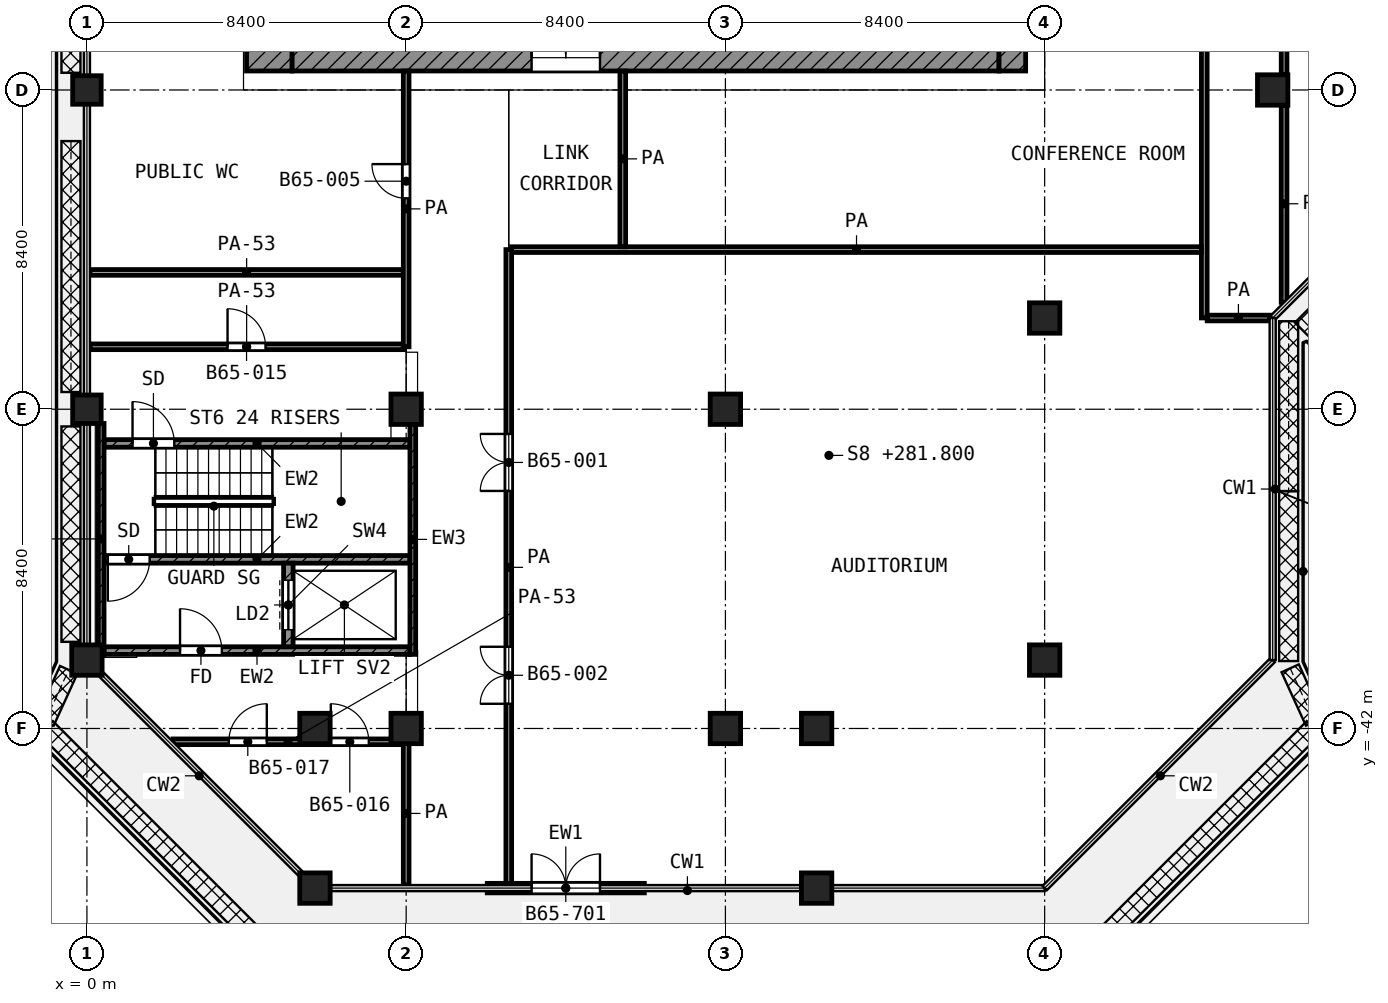
"""IFC4 building model, lengths in metres.
Left out: names, types, materials, properties, quantities, classifications, styles, units other than length and angle.
Written with IfcOpenShell. Run it as: python <this file> out.ifc"""

import sys

from ifc_helpers import new_model, si_unit, direction, frame, frame_2d, origin, origin_2d, place, context, subcontext, project, spatial, rectangle, extrude, element, fill, save


model = new_model("IFC4")
c1 = context("Model", 3, precision=1e-05, world=origin(), true_north=direction((0.0, 1.0)))
c2 = subcontext(c1, "Body", "Model", "MODEL_VIEW")
j1 = project(units=[si_unit("LENGTHUNIT", "METRE"), si_unit("PLANEANGLEUNIT", "RADIAN")], contexts=[c1])
p1 = place(None, origin())
s1 = spatial("IfcSite", under=j1, at=p1, CompositionType="ELEMENT")
p2 = place(p1, origin())
s2 = spatial("IfcBuilding", under=s1, at=p2, CompositionType="ELEMENT")
p3 = place(p2, frame((0.0, 0.0, 281.8)))
s3 = spatial("IfcBuildingStorey", under=s2, at=p3, CompositionType="ELEMENT", Elevation=281.8)
p4 = place(p3, frame((0.0, -25.2, 0.0), z_axis=(0.0, 0.0, 1.0), x_axis=(1.0, 0.0, 0.0)))
e1 = element("IfcColumn", 1, at=p4, inside=s3, PredefinedType="COLUMN", context=c2, shape_type="SweptSolid", body=[
    extrude(rectangle(XDim=0.75, YDim=0.75, at=origin_2d()), origin(), (0.0, 0.0, 1.0), 4.2),
])
for number, where, z_axis, x_axis in (
    (2, (31.2, -25.2, 0.0), (0.0, 0.0, 1.0), (1.0, 0.0, 0.0)),
    (3, (25.2, -31.2, 0.0), (0.0, 0.0, 1.0), (1.0, 0.0, 0.0)),
):
    element("IfcColumn", number, at=place(p3, frame(where, z_axis=z_axis, x_axis=x_axis)), inside=s3, PredefinedType="COLUMN", context=c2, shape_type="SweptSolid", body=[
        extrude(rectangle(XDim=0.8, YDim=0.8, at=origin_2d()), origin(), (0.0, 0.0, 1.0), 4.2),
    ])
p5 = place(p3, frame((0.0, -33.6, 0.0), z_axis=(0.0, 0.0, 1.0), x_axis=(1.0, 0.0, 0.0)))
e4 = element("IfcColumn", 4, at=p5, inside=s3, PredefinedType="COLUMN", context=c2, shape_type="SweptSolid", body=[
    extrude(rectangle(XDim=0.75, YDim=0.75, at=origin_2d()), origin(), (0.0, 0.0, 1.0), 4.2),
])
for number, where, z_axis, x_axis in (
    (5, (8.4, -33.6, 0.0), (0.0, 0.0, 1.0), (1.0, 0.0, 0.0)),
    (6, (16.8, -33.6, 0.0), (0.0, 0.0, 1.0), (1.0, 0.0, 0.0)),
    (7, (0.0, -40.2, 0.0), (0.0, 0.0, 1.0), (1.0, 0.0, 0.0)),
    (8, (25.2, -40.2, 0.0), (0.0, 0.0, 1.0), (1.0, 0.0, 0.0)),
    (9, (6.0, -42.0, 0.0), (0.0, 0.0, 1.0), (1.0, 0.0, 0.0)),
    (10, (8.4, -42.0, 0.0), (0.0, 0.0, 1.0), (1.0, 0.0, 0.0)),
    (11, (16.8, -42.0, 0.0), (0.0, 0.0, 1.0), (1.0, 0.0, 0.0)),
    (12, (19.2, -42.0, 0.0), (0.0, 0.0, 1.0), (1.0, 0.0, 0.0)),
    (13, (6.0, -46.2, 0.0), (0.0, 0.0, 1.0), (1.0, 0.0, 0.0)),
    (14, (19.2, -46.2, 0.0), (0.0, 0.0, 1.0), (1.0, 0.0, 0.0)),
):
    element("IfcColumn", number, at=place(p3, frame(where, z_axis=z_axis, x_axis=x_axis)), inside=s3, PredefinedType="COLUMN", context=c2, shape_type="SweptSolid", body=[
        extrude(rectangle(XDim=0.8, YDim=0.8, at=origin_2d()), origin(), (0.0, 0.0, 1.0), 4.2),
    ])
p6 = place(p3, frame((10.533, -46.2, 0.0), z_axis=(0.0, 0.0, 1.0), x_axis=(1.0, 0.0, 0.0)))
e15 = element("IfcWall", 15, at=p6, inside=s3, PredefinedType="SOLIDWALL", context=c2, shape_type="SweptSolid", body=[
    extrude(rectangle(XDim=4.133, YDim=0.25, at=frame_2d((2.067, 0.0))), origin(), (0.0, 0.0, 1.0), 3.48),
])
p7 = place(p6, frame((1.167, 0.0, 0.0)))
e16 = element("IfcOpeningElement", 16, at=p7, cuts=e15, PredefinedType="OPENING", context=c2, shape_type="SweptSolid", body=[
    extrude(rectangle(XDim=1.8, YDim=2.1, at=frame_2d((0.9, 1.05))), frame((0.0, 0.135, 0.0), z_axis=(0.0, -1.0, 0.0), x_axis=(1.0, 0.0, 0.0)), (0.0, 0.0, 1.0), 0.27),
])
p8 = place(p3, frame((4.8, -24.7, 0.0), z_axis=(0.0, 0.0, 1.0), x_axis=(0.0, 1.0, 0.0)))
e17 = element("IfcWall", 17, at=p8, inside=s3, PredefinedType="SHEAR", context=c2, shape_type="SweptSolid", body=[
    extrude(rectangle(XDim=19.3, YDim=1.2, at=frame_2d((9.65, 0.0))), origin(), (0.0, 0.0, 1.0), 3.6),
])
p9 = place(p8, frame((11.15, 0.0, 0.0)))
e18 = element("IfcOpeningElement", 18, at=p9, cuts=e17, PredefinedType="OPENING", context=c2, shape_type="SweptSolid", body=[
    extrude(rectangle(XDim=1.1, YDim=2.1, at=frame_2d((0.55, 1.05))), frame((0.0, 0.61, 0.0), z_axis=(0.0, -1.0, 0.0), x_axis=(1.0, 0.0, 0.0)), (0.0, 0.0, 1.0), 1.22),
])
p10 = place(p8, frame((1.85, 0.0, 0.0)))
e19 = element("IfcOpeningElement", 19, at=p10, cuts=e17, PredefinedType="OPENING", context=c2, shape_type="SweptSolid", body=[
    extrude(rectangle(XDim=1.1, YDim=2.1, at=frame_2d((0.55, 1.05))), frame((0.0, 0.61, 0.0), z_axis=(0.0, -1.0, 0.0), x_axis=(1.0, 0.0, 0.0)), (0.0, 0.0, 1.0), 1.22),
])
p11 = place(p3, frame((5.4, -24.35, 0.0), z_axis=(0.0, 0.0, 1.0), x_axis=(1.0, 0.0, 0.0)))
e20 = element("IfcWall", 20, at=p11, inside=s3, PredefinedType="SHEAR", context=c2, shape_type="SweptSolid", body=[
    extrude(rectangle(XDim=18.6, YDim=0.7, at=frame_2d((9.3, 0.0))), origin(), (0.0, 0.0, 1.0), 3.6),
])
p12 = place(p11, frame((6.3, 0.0, 0.0)))
e21 = element("IfcOpeningElement", 21, at=p12, cuts=e20, PredefinedType="OPENING", context=c2, shape_type="SweptSolid", body=[
    extrude(rectangle(XDim=1.8, YDim=2.1, at=frame_2d((0.9, 1.05))), frame((0.0, 0.36, 0.0), z_axis=(0.0, -1.0, 0.0), x_axis=(1.0, 0.0, 0.0)), (0.0, 0.0, 1.0), 0.72),
])
p13 = place(p3, frame((24.35, -24.7, 0.0), z_axis=(0.0, 0.0, 1.0), x_axis=(0.0, 1.0, 0.0)))
e22 = element("IfcWall", 22, at=p13, inside=s3, PredefinedType="SHEAR", context=c2, shape_type="SweptSolid", body=[
    extrude(rectangle(XDim=0.7, YDim=0.7, at=frame_2d((0.35, 0.0))), origin(), (0.0, 0.0, 1.0), 3.6),
])
p14 = place(p3, frame((0.375, -40.05, 0.0), z_axis=(0.0, 0.0, 1.0), x_axis=(0.0, 1.0, 0.0)))
e23 = element("IfcWall", 23, at=p14, inside=s3, PredefinedType="SHEAR", context=c2, shape_type="SweptSolid", body=[
    extrude(rectangle(XDim=6.075, YDim=0.15, at=frame_2d((3.038, 0.0))), origin(), (0.0, 0.0, 1.0), 3.6),
])
p15 = place(p3, frame((8.575, -40.05, 0.0), z_axis=(0.0, 0.0, 1.0), x_axis=(0.0, 1.0, 0.0)))
e24 = element("IfcWall", 24, at=p15, inside=s3, PredefinedType="SHEAR", context=c2, shape_type="SweptSolid", body=[
    extrude(rectangle(XDim=6.05, YDim=0.15, at=frame_2d((3.025, 0.0))), origin(), (0.0, 0.0, 1.0), 3.6),
])
p16 = place(p3, frame((0.45, -34.5, 0.0), z_axis=(0.0, 0.0, 1.0), x_axis=(1.0, 0.0, 0.0)))
e25 = element("IfcWall", 25, at=p16, inside=s3, PredefinedType="SHEAR", context=c2, shape_type="SweptSolid", body=[
    extrude(rectangle(XDim=8.05, YDim=0.2, at=frame_2d((4.025, 0.0))), origin(), (0.0, 0.0, 1.0), 3.6),
])
p17 = place(p16, frame((0.75, 0.0, 0.0)))
e26 = element("IfcOpeningElement", 26, at=p17, cuts=e25, PredefinedType="OPENING", context=c2, shape_type="SweptSolid", body=[
    extrude(rectangle(XDim=1.1, YDim=2.1, at=frame_2d((0.55, 1.05))), frame((0.0, 0.11, 0.0), z_axis=(0.0, -1.0, 0.0), x_axis=(1.0, 0.0, 0.0)), (0.0, 0.0, 1.0), 0.22),
])
p18 = place(p3, frame((0.45, -37.55, 0.0), z_axis=(0.0, 0.0, 1.0), x_axis=(1.0, 0.0, 0.0)))
e27 = element("IfcWall", 27, at=p18, inside=s3, PredefinedType="SHEAR", context=c2, shape_type="SweptSolid", body=[
    extrude(rectangle(XDim=8.05, YDim=0.2, at=frame_2d((4.025, 0.0))), origin(), (0.0, 0.0, 1.0), 3.6),
])
p19 = place(p18, frame((0.1, 0.0, 0.0)))
e28 = element("IfcOpeningElement", 28, at=p19, cuts=e27, PredefinedType="OPENING", context=c2, shape_type="SweptSolid", body=[
    extrude(rectangle(XDim=1.1, YDim=2.1, at=frame_2d((0.55, 1.05))), frame((0.0, 0.11, 0.0), z_axis=(0.0, -1.0, 0.0), x_axis=(1.0, 0.0, 0.0)), (0.0, 0.0, 1.0), 0.22),
])
p20 = place(p3, frame((0.45, -39.95, 0.0), z_axis=(0.0, 0.0, 1.0), x_axis=(1.0, 0.0, 0.0)))
e29 = element("IfcWall", 29, at=p20, inside=s3, PredefinedType="SHEAR", context=c2, shape_type="SweptSolid", body=[
    extrude(rectangle(XDim=8.05, YDim=0.2, at=frame_2d((4.025, 0.0))), origin(), (0.0, 0.0, 1.0), 3.6),
])
p21 = place(p20, frame((2.0, 0.0, 0.0)))
e30 = element("IfcOpeningElement", 30, at=p21, cuts=e29, PredefinedType="OPENING", context=c2, shape_type="SweptSolid", body=[
    extrude(rectangle(XDim=1.1, YDim=2.1, at=frame_2d((0.55, 1.05))), frame((0.0, 0.11, 0.0), z_axis=(0.0, -1.0, 0.0), x_axis=(1.0, 0.0, 0.0)), (0.0, 0.0, 1.0), 0.22),
])
p22 = place(p3, frame((5.3, -39.85, 0.0), z_axis=(0.0, 0.0, 1.0), x_axis=(0.0, 1.0, 0.0)))
e31 = element("IfcWall", 31, at=p22, inside=s3, PredefinedType="SHEAR", context=c2, shape_type="SweptSolid", body=[
    extrude(rectangle(XDim=2.2, YDim=0.25, at=frame_2d((1.1, 0.0))), origin(), (0.0, 0.0, 1.0), 3.6),
])
p23 = place(p22, frame((0.45, 0.0, 0.0)))
e32 = element("IfcOpeningElement", 32, at=p23, cuts=e31, PredefinedType="OPENING", context=c2, shape_type="SweptSolid", body=[
    extrude(rectangle(XDim=1.3, YDim=2.1, at=frame_2d((0.65, 1.05))), frame((0.0, 0.135, 0.0), z_axis=(0.0, -1.0, 0.0), x_axis=(1.0, 0.0, 0.0)), (0.0, 0.0, 1.0), 0.27),
])
p24 = place(p3, frame((2.263, -42.35, 0.0), z_axis=(0.0, 0.0, 1.0), x_axis=(1.0, 0.0, 0.0)))
e33 = element("IfcWall", 33, at=p24, inside=s3, PredefinedType="PARTITIONING", context=c2, shape_type="SweptSolid", body=[
    extrude(rectangle(XDim=6.062, YDim=0.15, at=frame_2d((3.031, 0.0))), origin(), (0.0, 0.0, 1.0), 2.7),
])
p25 = place(p24, frame((4.154, 0.0, 0.0)))
e34 = element("IfcOpeningElement", 34, at=p25, cuts=e33, PredefinedType="OPENING", context=c2, shape_type="SweptSolid", body=[
    extrude(rectangle(XDim=1.0, YDim=2.1, at=frame_2d((0.5, 1.05))), frame((0.0, 0.085, 0.0), z_axis=(0.0, -1.0, 0.0), x_axis=(1.0, 0.0, 0.0)), (0.0, 0.0, 1.0), 0.17),
])
p26 = place(p24, frame((1.47, 0.0, 0.0)))
e35 = element("IfcOpeningElement", 35, at=p26, cuts=e33, PredefinedType="OPENING", context=c2, shape_type="SweptSolid", body=[
    extrude(rectangle(XDim=1.0, YDim=2.1, at=frame_2d((0.5, 1.05))), frame((0.0, 0.085, 0.0), z_axis=(0.0, -1.0, 0.0), x_axis=(1.0, 0.0, 0.0)), (0.0, 0.0, 1.0), 0.17),
])
p27 = place(p3, frame((0.08, -31.957, 0.0), z_axis=(0.0, 0.0, 1.0), x_axis=(1.0, 0.0, 0.0)))
e36 = element("IfcWall", 36, at=p27, inside=s3, PredefinedType="PARTITIONING", context=c2, shape_type="SweptSolid", body=[
    extrude(rectangle(XDim=8.245, YDim=0.15, at=frame_2d((4.123, 0.0))), origin(), (0.0, 0.0, 1.0), 2.7),
])
p28 = place(p27, frame((3.62, 0.0, 0.0)))
e37 = element("IfcOpeningElement", 37, at=p28, cuts=e36, PredefinedType="OPENING", context=c2, shape_type="SweptSolid", body=[
    extrude(rectangle(XDim=1.0, YDim=2.1, at=frame_2d((0.5, 1.05))), frame((0.0, 0.085, 0.0), z_axis=(0.0, -1.0, 0.0), x_axis=(1.0, 0.0, 0.0)), (0.0, 0.0, 1.0), 0.17),
])
p29 = place(p3, frame((29.477, -31.2, 0.0), z_axis=(0.0, 0.0, 1.0), x_axis=(1.0, 0.0, 0.0)))
e38 = element("IfcWall", 38, at=p29, inside=s3, PredefinedType="PARTITIONING", context=c2, shape_type="SweptSolid", body=[
    extrude(rectangle(XDim=1.643, YDim=0.15, at=frame_2d((0.822, 0.0))), origin(), (0.0, 0.0, 1.0), 3.6),
])
p30 = place(p3, frame((0.08, -30.0, 0.0), z_axis=(0.0, 0.0, 1.0), x_axis=(1.0, 0.0, 0.0)))
e39 = element("IfcWall", 39, at=p30, inside=s3, PredefinedType="PARTITIONING", context=c2, shape_type="SweptSolid", body=[
    extrude(rectangle(XDim=8.245, YDim=0.15, at=frame_2d((4.123, 0.0))), origin(), (0.0, 0.0, 1.0), 2.7),
])
p31 = place(p3, frame((11.175, -29.4, 0.0), z_axis=(0.0, 0.0, 1.0), x_axis=(1.0, 0.0, 0.0)))
e40 = element("IfcWall", 40, at=p31, inside=s3, PredefinedType="PARTITIONING", context=c2, shape_type="SweptSolid", body=[
    extrude(rectangle(XDim=18.15, YDim=0.15, at=frame_2d((9.075, 0.0))), origin(), (0.0, 0.0, 1.0), 3.6),
])
p32 = place(p3, frame((8.4, -46.12, 0.0), z_axis=(0.0, 0.0, 1.0), x_axis=(0.0, 1.0, 0.0)))
e41 = element("IfcWall", 41, at=p32, inside=s3, PredefinedType="PARTITIONING", context=c2, shape_type="SweptSolid", body=[
    extrude(rectangle(XDim=3.77, YDim=0.15, at=frame_2d((1.885, 0.0))), origin(), (0.0, 0.0, 1.0), 3.6),
])
p33 = place(p3, frame((8.4, -31.957, 0.0), z_axis=(0.0, 0.0, 1.0), x_axis=(0.0, 1.0, 0.0)))
e42 = element("IfcWall", 42, at=p33, inside=s3, PredefinedType="PARTITIONING", context=c2, shape_type="SweptSolid", body=[
    extrude(rectangle(XDim=7.257, YDim=0.15, at=frame_2d((3.628, 0.0))), origin(), (0.0, 0.0, 1.0), 3.6),
])
p34 = place(p33, frame((3.907, 0.0, 0.0)))
e43 = element("IfcOpeningElement", 43, at=p34, cuts=e42, PredefinedType="OPENING", context=c2, shape_type="SweptSolid", body=[
    extrude(rectangle(XDim=0.9, YDim=2.1, at=frame_2d((0.45, 1.05))), frame((0.0, 0.085, 0.0), z_axis=(0.0, -1.0, 0.0), x_axis=(1.0, 0.0, 0.0)), (0.0, 0.0, 1.0), 0.17),
])
p35 = place(p3, frame((11.1, -46.12, 0.0), z_axis=(0.0, 0.0, 1.0), x_axis=(0.0, 1.0, 0.0)))
e44 = element("IfcWall", 44, at=p35, inside=s3, PredefinedType="PARTITIONING", context=c2, shape_type="SweptSolid", body=[
    extrude(rectangle(XDim=16.72, YDim=0.15, at=frame_2d((8.36, 0.0))), origin(), (0.0, 0.0, 1.0), 3.6),
])
p36 = place(p35, frame((10.37, 0.0, 0.0)))
e45 = element("IfcOpeningElement", 45, at=p36, cuts=e44, PredefinedType="OPENING", context=c2, shape_type="SweptSolid", body=[
    extrude(rectangle(XDim=1.5, YDim=2.1, at=frame_2d((0.75, 1.05))), frame((0.0, 0.085, 0.0), z_axis=(0.0, -1.0, 0.0), x_axis=(1.0, 0.0, 0.0)), (0.0, 0.0, 1.0), 0.17),
])
p37 = place(p35, frame((4.77, 0.0, 0.0)))
e46 = element("IfcOpeningElement", 46, at=p37, cuts=e44, PredefinedType="OPENING", context=c2, shape_type="SweptSolid", body=[
    extrude(rectangle(XDim=1.5, YDim=2.1, at=frame_2d((0.75, 1.05))), frame((0.0, 0.085, 0.0), z_axis=(0.0, -1.0, 0.0), x_axis=(1.0, 0.0, 0.0)), (0.0, 0.0, 1.0), 0.17),
])
p38 = place(p3, frame((14.1, -29.325, 0.0), z_axis=(0.0, 0.0, 1.0), x_axis=(0.0, 1.0, 0.0)))
e47 = element("IfcWall", 47, at=p38, inside=s3, PredefinedType="PARTITIONING", context=c2, shape_type="SweptSolid", body=[
    extrude(rectangle(XDim=4.625, YDim=0.15, at=frame_2d((2.312, 0.0))), origin(), (0.0, 0.0, 1.0), 3.6),
])
p39 = place(p3, frame((29.4, -31.198, 0.0), z_axis=(0.0, 0.0, 1.0), x_axis=(0.0, 1.0, 0.0)))
e48 = element("IfcWall", 48, at=p39, inside=s3, PredefinedType="PARTITIONING", context=c2, shape_type="SweptSolid", body=[
    extrude(rectangle(XDim=20.098, YDim=0.15, at=frame_2d((10.049, 0.0))), origin(), (0.0, 0.0, 1.0), 3.6),
])
p40 = place(p39, frame((18.098, 0.0, 0.0)))
e49 = element("IfcOpeningElement", 49, at=p40, cuts=e48, PredefinedType="OPENING", context=c2, shape_type="SweptSolid", body=[
    extrude(rectangle(XDim=1.0, YDim=2.1, at=frame_2d((0.5, 1.05))), frame((0.0, 0.085, 0.0), z_axis=(0.0, -1.0, 0.0), x_axis=(1.0, 0.0, 0.0)), (0.0, 0.0, 1.0), 0.17),
])
p41 = place(p3, frame((31.5, -30.787, 0.0), z_axis=(0.0, 0.0, 1.0), x_axis=(0.0, 1.0, 0.0)))
e50 = element("IfcWall", 50, at=p41, inside=s3, PredefinedType="PARTITIONING", context=c2, shape_type="SweptSolid", body=[
    extrude(rectangle(XDim=5.187, YDim=0.15, at=frame_2d((2.594, 0.0))), origin(), (0.0, 0.0, 1.0), 3.6),
])
p42 = place(p3, frame((31.5, -24.8, 0.0), z_axis=(0.0, 0.0, 1.0), x_axis=(0.0, 1.0, 0.0)))
e51 = element("IfcWall", 51, at=p42, inside=s3, PredefinedType="PARTITIONING", context=c2, shape_type="SweptSolid", body=[
    extrude(rectangle(XDim=13.625, YDim=0.15, at=frame_2d((6.812, 0.0))), origin(), (0.0, 0.0, 1.0), 3.6),
])
p43 = place(p7, origin())
e52 = element("IfcDoor", 52, at=p43, inside=s3, OperationType="DOUBLE_DOOR_SINGLE_SWING", PredefinedType="DOOR", context=c2, shape_type="SweptSolid", body=[
    extrude(rectangle(XDim=1.8, YDim=2.1, at=frame_2d((0.9, 1.05))), frame((0.0, 0.025, 0.0), z_axis=(0.0, -1.0, 0.0), x_axis=(1.0, 0.0, 0.0)), (0.0, 0.0, 1.0), 0.05),
])
fill(e16, e52)
p44 = place(p12, origin())
e53 = element("IfcDoor", 53, at=p44, inside=s3, OperationType="DOUBLE_DOOR_SINGLE_SWING", PredefinedType="DOOR", context=c2, shape_type="SweptSolid", body=[
    extrude(rectangle(XDim=1.8, YDim=2.1, at=frame_2d((0.9, 1.05))), frame((0.0, 0.025, 0.0), z_axis=(0.0, -1.0, 0.0), x_axis=(1.0, 0.0, 0.0)), (0.0, 0.0, 1.0), 0.05),
])
fill(e21, e53)
p45 = place(p17, origin())
e54 = element("IfcDoor", 54, at=p45, inside=s3, OperationType="SINGLE_SWING_LEFT", PredefinedType="DOOR", context=c2, shape_type="SweptSolid", body=[
    extrude(rectangle(XDim=1.1, YDim=2.1, at=frame_2d((0.55, 1.05))), frame((0.0, 0.025, 0.0), z_axis=(0.0, -1.0, 0.0), x_axis=(1.0, 0.0, 0.0)), (0.0, 0.0, 1.0), 0.05),
])
fill(e26, e54)
p46 = place(p19, frame((1.1, 0.0, 0.0), z_axis=(0.0, 0.0, 1.0), x_axis=(-1.0, 0.0, 0.0)))
e55 = element("IfcDoor", 55, at=p46, inside=s3, OperationType="SINGLE_SWING_LEFT", PredefinedType="DOOR", context=c2, shape_type="SweptSolid", body=[
    extrude(rectangle(XDim=1.1, YDim=2.1, at=frame_2d((0.55, 1.05))), frame((0.0, 0.025, 0.0), z_axis=(0.0, -1.0, 0.0), x_axis=(1.0, 0.0, 0.0)), (0.0, 0.0, 1.0), 0.05),
])
fill(e28, e55)
p47 = place(p23, origin())
e56 = element("IfcDoor", 56, at=p47, inside=s3, OperationType="DOUBLE_DOOR_SLIDING", PredefinedType="DOOR", context=c2, shape_type="SweptSolid", body=[
    extrude(rectangle(XDim=1.3, YDim=2.1, at=frame_2d((0.65, 1.05))), frame((0.0, 0.025, 0.0), z_axis=(0.0, -1.0, 0.0), x_axis=(1.0, 0.0, 0.0)), (0.0, 0.0, 1.0), 0.05),
])
fill(e32, e56)
p48 = place(p21, origin())
e57 = element("IfcDoor", 57, at=p48, inside=s3, OperationType="SINGLE_SWING_LEFT", PredefinedType="DOOR", context=c2, shape_type="SweptSolid", body=[
    extrude(rectangle(XDim=1.1, YDim=2.1, at=frame_2d((0.55, 1.05))), frame((0.0, 0.025, 0.0), z_axis=(0.0, -1.0, 0.0), x_axis=(1.0, 0.0, 0.0)), (0.0, 0.0, 1.0), 0.05),
])
fill(e30, e57)
p49 = place(p34, origin())
e58 = element("IfcDoor", 58, at=p49, inside=s3, OperationType="SINGLE_SWING_RIGHT", PredefinedType="DOOR", context=c2, shape_type="SweptSolid", body=[
    extrude(rectangle(XDim=0.9, YDim=2.1, at=frame_2d((0.45, 1.05))), frame((0.0, 0.025, 0.0), z_axis=(0.0, -1.0, 0.0), x_axis=(1.0, 0.0, 0.0)), (0.0, 0.0, 1.0), 0.05),
])
fill(e43, e58)
p50 = place(p28, origin())
e59 = element("IfcDoor", 59, at=p50, inside=s3, OperationType="SINGLE_SWING_LEFT", PredefinedType="DOOR", context=c2, shape_type="SweptSolid", body=[
    extrude(rectangle(XDim=1.0, YDim=2.1, at=frame_2d((0.5, 1.05))), frame((0.0, 0.025, 0.0), z_axis=(0.0, -1.0, 0.0), x_axis=(1.0, 0.0, 0.0)), (0.0, 0.0, 1.0), 0.05),
])
fill(e37, e59)
p51 = place(p25, origin())
e60 = element("IfcDoor", 60, at=p51, inside=s3, OperationType="SINGLE_SWING_LEFT", PredefinedType="DOOR", context=c2, shape_type="SweptSolid", body=[
    extrude(rectangle(XDim=1.0, YDim=2.1, at=frame_2d((0.5, 1.05))), frame((0.0, 0.025, 0.0), z_axis=(0.0, -1.0, 0.0), x_axis=(1.0, 0.0, 0.0)), (0.0, 0.0, 1.0), 0.05),
])
fill(e34, e60)
p52 = place(p26, origin())
e61 = element("IfcDoor", 61, at=p52, inside=s3, OperationType="SINGLE_SWING_RIGHT", PredefinedType="DOOR", context=c2, shape_type="SweptSolid", body=[
    extrude(rectangle(XDim=1.0, YDim=2.1, at=frame_2d((0.5, 1.05))), frame((0.0, 0.025, 0.0), z_axis=(0.0, -1.0, 0.0), x_axis=(1.0, 0.0, 0.0)), (0.0, 0.0, 1.0), 0.05),
])
fill(e35, e61)
p53 = place(p36, origin())
e62 = element("IfcDoor", 62, at=p53, inside=s3, OperationType="DOUBLE_DOOR_SINGLE_SWING", PredefinedType="DOOR", context=c2, shape_type="SweptSolid", body=[
    extrude(rectangle(XDim=1.5, YDim=2.1, at=frame_2d((0.75, 1.05))), frame((0.0, 0.025, 0.0), z_axis=(0.0, -1.0, 0.0), x_axis=(1.0, 0.0, 0.0)), (0.0, 0.0, 1.0), 0.05),
])
fill(e45, e62)
p54 = place(p37, origin())
e63 = element("IfcDoor", 63, at=p54, inside=s3, OperationType="DOUBLE_DOOR_SINGLE_SWING", PredefinedType="DOOR", context=c2, shape_type="SweptSolid", body=[
    extrude(rectangle(XDim=1.5, YDim=2.1, at=frame_2d((0.75, 1.05))), frame((0.0, 0.025, 0.0), z_axis=(0.0, -1.0, 0.0), x_axis=(1.0, 0.0, 0.0)), (0.0, 0.0, 1.0), 0.05),
])
fill(e46, e63)
save(model, sys.argv[1])
